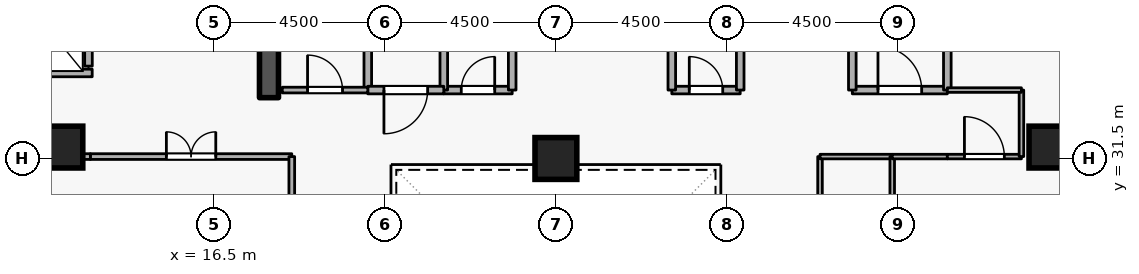
"""IFC4 building model, lengths in metres.
Left out: names, types, materials, properties, quantities, classifications, styles, units other than length and angle.
Written with IfcOpenShell. Run it as: python <this file> out.ifc"""

import sys

from ifc_helpers import new_model, si_unit, direction, frame, frame_2d, origin, origin_2d, place, context, subcontext, project, spatial, rectangle, extrude, element, fill, save


model = new_model("IFC4")
c1 = context("Model", 3, precision=1e-05, world=origin(), true_north=direction((0.0, 1.0)))
c2 = subcontext(c1, "Body", "Model", "MODEL_VIEW")
j1 = project(units=[si_unit("LENGTHUNIT", "METRE"), si_unit("PLANEANGLEUNIT", "RADIAN")], contexts=[c1])
p1 = place(None, origin())
s1 = spatial("IfcSite", under=j1, at=p1, CompositionType="ELEMENT")
p2 = place(p1, origin())
s2 = spatial("IfcBuilding", under=s1, at=p2, CompositionType="ELEMENT")
p3 = place(p2, frame((0.0, 0.0, 170.7)))
s3 = spatial("IfcBuildingStorey", under=s2, at=p3, CompositionType="ELEMENT", Elevation=170.7)
p4 = place(p3, frame((17.95, 33.1, 0.0), z_axis=(0.0, 0.0, 1.0), x_axis=(0.0, 1.0, 0.0)))
e1 = element("IfcWall", 1, at=p4, inside=s3, PredefinedType="SHEAR", context=c2, shape_type="SweptSolid", body=[
    extrude(rectangle(XDim=5.8, YDim=0.5, at=frame_2d((2.9, 0.0))), origin(), (0.0, 0.0, 1.0), 3.6),
])
for number, where, z_axis, x_axis in (
    (2, (12.5, 31.8, 0.0), (0.0, 0.0, 1.0), (1.0, 0.0, 0.0)),
    (3, (38.5, 31.8, 0.0), (0.0, 0.0, 1.0), (1.0, 0.0, 0.0)),
    (4, (25.5, 31.5, 0.0), (0.0, 0.0, 1.0), (1.0, 0.0, 0.0)),
):
    element("IfcColumn", number, at=place(p3, frame(where, z_axis=z_axis, x_axis=x_axis)), inside=s3, PredefinedType="COLUMN", context=c2, shape_type="SweptSolid", body=[
        extrude(rectangle(XDim=1.1, YDim=1.1, at=origin_2d()), origin(), (0.0, 0.0, 1.0), 3.6),
    ])
p5 = place(p3, frame((13.2, 33.93, 0.0), z_axis=(0.0, 0.0, 1.0), x_axis=(0.0, 1.0, 0.0)))
e5 = element("IfcWall", 5, at=p5, inside=s3, PredefinedType="STANDARD", context=c2, shape_type="SweptSolid", body=[
    extrude(rectangle(XDim=1.94, YDim=0.2, at=frame_2d((0.97, 0.0))), origin(), (0.0, 0.0, 1.0), 3.26),
])
p6 = place(p5, frame((0.46, 0.0, 0.0)))
e6 = element("IfcOpeningElement", 6, at=p6, cuts=e5, PredefinedType="OPENING", context=c2, shape_type="SweptSolid", body=[
    extrude(rectangle(XDim=1.02, YDim=2.06, at=frame_2d((0.51, 1.03))), frame((0.0, 0.11, 0.0), z_axis=(0.0, -1.0, 0.0), x_axis=(1.0, 0.0, 0.0)), (0.0, 0.0, 1.0), 0.22),
])
p7 = place(p3, frame((11.002, 33.75, 0.0), z_axis=(0.0, 0.0, 1.0), x_axis=(1.0, 0.0, 0.0)))
e7 = element("IfcWall", 7, at=p7, inside=s3, PredefinedType="STANDARD", context=c2, shape_type="SweptSolid", body=[
    extrude(rectangle(XDim=2.296, YDim=0.2, at=frame_2d((1.148, 0.0))), origin(), (0.0, 0.0, 1.0), 3.26),
])
p8 = place(p3, frame((33.3, 33.3, 0.0), z_axis=(0.0, 0.0, 1.0), x_axis=(1.0, 0.0, 0.0)))
e8 = element("IfcWall", 8, at=p8, inside=s3, PredefinedType="STANDARD", context=c2, shape_type="SweptSolid", body=[
    extrude(rectangle(XDim=2.5, YDim=0.2, at=frame_2d((1.25, 0.0))), origin(), (0.0, 0.0, 1.0), 3.26),
])
p9 = place(p8, frame((0.675, 0.0, 0.0)))
e9 = element("IfcOpeningElement", 9, at=p9, cuts=e8, PredefinedType="OPENING", context=c2, shape_type="SweptSolid", body=[
    extrude(rectangle(XDim=1.15, YDim=2.1, at=frame_2d((0.575, 1.05))), frame((0.0, 0.11, 0.0), z_axis=(0.0, -1.0, 0.0), x_axis=(1.0, 0.0, 0.0)), (0.0, 0.0, 1.0), 0.22),
])
p10 = place(p3, frame((35.8, 33.3, 0.0), z_axis=(0.0, 0.0, 1.0), x_axis=(0.0, 1.0, 0.0)))
e10 = element("IfcWall", 10, at=p10, inside=s3, PredefinedType="STANDARD", context=c2, shape_type="SweptSolid", body=[
    extrude(rectangle(XDim=5.7, YDim=0.2, at=frame_2d((2.85, 0.0))), origin(), (0.0, 0.0, 1.0), 3.26),
])
p11 = place(p3, frame((33.3, 35.6, 0.0), z_axis=(0.0, 0.0, 1.0), x_axis=(0.0, -1.0, 0.0)))
e11 = element("IfcWall", 11, at=p11, inside=s3, PredefinedType="STANDARD", context=c2, shape_type="SweptSolid", body=[
    extrude(rectangle(XDim=2.3, YDim=0.2, at=frame_2d((1.15, 0.0))), origin(), (0.0, 0.0, 1.0), 2.465),
])
p12 = place(p3, frame((22.55, 33.3, 0.0), z_axis=(0.0, 0.0, 1.0), x_axis=(1.0, 0.0, 0.0)))
e12 = element("IfcWall", 12, at=p12, inside=s3, PredefinedType="STANDARD", context=c2, shape_type="SweptSolid", body=[
    extrude(rectangle(XDim=1.8, YDim=0.2, at=frame_2d((0.9, 0.0))), origin(), (0.0, 0.0, 1.0), 3.26),
])
p13 = place(p12, frame((0.46, 0.0, 0.0)))
e13 = element("IfcOpeningElement", 13, at=p13, cuts=e12, PredefinedType="OPENING", context=c2, shape_type="SweptSolid", body=[
    extrude(rectangle(XDim=0.88, YDim=2.04, at=frame_2d((0.44, 1.02))), frame((0.0, 0.11, 0.0), z_axis=(0.0, -1.0, 0.0), x_axis=(1.0, 0.0, 0.0)), (0.0, 0.0, 1.0), 0.22),
])
for number, where, z_axis, x_axis in (
    (14, (24.35, 33.3, 0.0), (0.0, 0.0, 1.0), (0.0, 1.0, 0.0)),
    (15, (22.55, 35.35, 0.0), (0.0, 0.0, 1.0), (0.0, -1.0, 0.0)),
):
    element("IfcWall", number, at=place(p3, frame(where, z_axis=z_axis, x_axis=x_axis)), inside=s3, PredefinedType="STANDARD", context=c2, shape_type="SweptSolid", body=[
        extrude(rectangle(XDim=2.05, YDim=0.2, at=frame_2d((1.025, 0.0))), origin(), (0.0, 0.0, 1.0), 3.26),
    ])
p14 = place(p3, frame((28.55, 33.3, 0.0), z_axis=(0.0, 0.0, 1.0), x_axis=(1.0, 0.0, 0.0)))
e16 = element("IfcWall", 16, at=p14, inside=s3, PredefinedType="STANDARD", context=c2, shape_type="SweptSolid", body=[
    extrude(rectangle(XDim=1.8, YDim=0.2, at=frame_2d((0.9, 0.0))), origin(), (0.0, 0.0, 1.0), 3.26),
])
p15 = place(p14, frame((0.46, 0.0, 0.0)))
e17 = element("IfcOpeningElement", 17, at=p15, cuts=e16, PredefinedType="OPENING", context=c2, shape_type="SweptSolid", body=[
    extrude(rectangle(XDim=0.88, YDim=2.04, at=frame_2d((0.44, 1.02))), frame((0.0, 0.11, 0.0), z_axis=(0.0, -1.0, 0.0), x_axis=(1.0, 0.0, 0.0)), (0.0, 0.0, 1.0), 0.22),
])
for number, where, z_axis, x_axis in (
    (18, (30.35, 33.3, 0.0), (0.0, 0.0, 1.0), (0.0, 1.0, 0.0)),
    (19, (28.55, 35.35, 0.0), (0.0, 0.0, 1.0), (0.0, -1.0, 0.0)),
    (20, (20.55, 33.3, 0.0), (0.0, 0.0, 1.0), (0.0, 1.0, 0.0)),
):
    element("IfcWall", number, at=place(p3, frame(where, z_axis=z_axis, x_axis=x_axis)), inside=s3, PredefinedType="STANDARD", context=c2, shape_type="SweptSolid", body=[
        extrude(rectangle(XDim=2.05, YDim=0.2, at=frame_2d((1.025, 0.0))), origin(), (0.0, 0.0, 1.0), 3.26),
    ])
p16 = place(p3, frame((22.55, 33.3, 0.0), z_axis=(0.0, 0.0, 1.0), x_axis=(-1.0, 0.0, 0.0)))
e21 = element("IfcWall", 21, at=p16, inside=s3, PredefinedType="STANDARD", context=c2, shape_type="SweptSolid", body=[
    extrude(rectangle(XDim=2.0, YDim=0.2, at=frame_2d((1.0, 0.0))), origin(), (0.0, 0.0, 1.0), 3.26),
])
p17 = place(p16, frame((0.425, 0.0, 0.0)))
e22 = element("IfcOpeningElement", 22, at=p17, cuts=e21, PredefinedType="OPENING", context=c2, shape_type="SweptSolid", body=[
    extrude(rectangle(XDim=1.15, YDim=2.1, at=frame_2d((0.575, 1.05))), frame((0.0, 0.11, 0.0), z_axis=(0.0, -1.0, 0.0), x_axis=(1.0, 0.0, 0.0)), (0.0, 0.0, 1.0), 0.22),
])
p18 = place(p3, frame((18.3, 33.3, 0.0), z_axis=(0.0, 0.0, 1.0), x_axis=(1.0, 0.0, 0.0)))
e23 = element("IfcWall", 23, at=p18, inside=s3, PredefinedType="PARTITIONING", context=c2, shape_type="SweptSolid", body=[
    extrude(rectangle(XDim=2.25, YDim=0.15, at=frame_2d((1.125, 0.0))), origin(), (0.0, 0.0, 1.0), 3.26),
])
p19 = place(p18, frame((0.665, 0.0, 0.0)))
e24 = element("IfcOpeningElement", 24, at=p19, cuts=e23, PredefinedType="OPENING", context=c2, shape_type="SweptSolid", body=[
    extrude(rectangle(XDim=0.92, YDim=2.08, at=frame_2d((0.46, 1.04))), frame((0.0, 0.085, 0.0), z_axis=(0.0, -1.0, 0.0), x_axis=(1.0, 0.0, 0.0)), (0.0, 0.0, 1.0), 0.17),
])
p20 = place(p3, frame((13.25, 31.55, 0.0), z_axis=(0.0, 0.0, 1.0), x_axis=(1.0, 0.0, 0.0)))
e25 = element("IfcWall", 25, at=p20, inside=s3, PredefinedType="PARTITIONING", context=c2, shape_type="SweptSolid", body=[
    extrude(rectangle(XDim=5.3, YDim=0.15, at=frame_2d((2.65, 0.0))), origin(), (0.0, 0.0, 1.0), 3.26),
])
p21 = place(p20, frame((2.0, 0.0, 0.0)))
e26 = element("IfcOpeningElement", 26, at=p21, cuts=e25, PredefinedType="OPENING", context=c2, shape_type="SweptSolid", body=[
    extrude(rectangle(XDim=1.3, YDim=2.12, at=frame_2d((0.65, 1.06))), frame((0.0, 0.085, 0.0), z_axis=(0.0, -1.0, 0.0), x_axis=(1.0, 0.0, 0.0)), (0.0, 0.0, 1.0), 0.17),
])
p22 = place(p3, frame((18.55, 31.55, 0.0), z_axis=(0.0, 0.0, 1.0), x_axis=(0.0, -1.0, 0.0)))
e27 = element("IfcWall", 27, at=p22, inside=s3, PredefinedType="PARTITIONING", context=c2, shape_type="SweptSolid", body=[
    extrude(rectangle(XDim=2.25, YDim=0.15, at=frame_2d((1.125, 0.0))), origin(), (0.0, 0.0, 1.0), 3.26),
])
p23 = place(p3, frame((10.9, 31.55, 0.0), z_axis=(0.0, 0.0, 1.0), x_axis=(1.0, 0.0, 0.0)))
e28 = element("IfcWall", 28, at=p23, inside=s3, PredefinedType="PARTITIONING", context=c2, shape_type="SweptSolid", body=[
    extrude(rectangle(XDim=2.35, YDim=0.15, at=frame_2d((1.175, 0.0))), origin(), (0.0, 0.0, 1.0), 3.26),
])
p24 = place(p3, frame((32.45, 27.0, 0.0), z_axis=(0.0, 0.0, 1.0), x_axis=(0.0, 1.0, 0.0)))
e29 = element("IfcWall", 29, at=p24, inside=s3, PredefinedType="PARTITIONING", context=c2, shape_type="SweptSolid", body=[
    extrude(rectangle(XDim=4.55, YDim=0.12, at=frame_2d((2.275, 0.0))), origin(), (0.0, 0.0, 1.0), 3.26),
])
p25 = place(p24, frame((1.8, 0.0, 0.0)))
e30 = element("IfcOpeningElement", 30, at=p25, cuts=e29, PredefinedType="OPENING", context=c2, shape_type="SweptSolid", body=[
    extrude(rectangle(XDim=0.95, YDim=2.1, at=frame_2d((0.475, 1.05))), frame((0.0, 0.07, 0.0), z_axis=(0.0, -1.0, 0.0), x_axis=(1.0, 0.0, 0.0)), (0.0, 0.0, 1.0), 0.14),
])
p26 = place(p3, frame((32.45, 31.55, 0.0), z_axis=(0.0, 0.0, 1.0), x_axis=(1.0, 0.0, 0.0)))
e31 = element("IfcWall", 31, at=p26, inside=s3, PredefinedType="PARTITIONING", context=c2, shape_type="SweptSolid", body=[
    extrude(rectangle(XDim=1.9, YDim=0.12, at=frame_2d((0.95, 0.0))), origin(), (0.0, 0.0, 1.0), 3.26),
])
p27 = place(p3, frame((34.35, 31.55, 0.0), z_axis=(0.0, 0.0, 1.0), x_axis=(0.0, -1.0, 0.0)))
e32 = element("IfcWall", 32, at=p27, inside=s3, PredefinedType="PARTITIONING", context=c2, shape_type="SweptSolid", body=[
    extrude(rectangle(XDim=4.55, YDim=0.12, at=frame_2d((2.275, 0.0))), origin(), (0.0, 0.0, 1.0), 3.26),
])
p28 = place(p3, frame((34.35, 31.55, 0.0), z_axis=(0.0, 0.0, 1.0), x_axis=(1.0, 0.0, 0.0)))
e33 = element("IfcWall", 33, at=p28, inside=s3, PredefinedType="PARTITIONING", context=c2, shape_type="SweptSolid", body=[
    extrude(rectangle(XDim=1.45, YDim=0.12, at=frame_2d((0.725, 0.0))), origin(), (0.0, 0.0, 1.0), 3.26),
])
p29 = place(p3, frame((35.8, 31.55, 0.0), z_axis=(0.0, 0.0, 1.0), x_axis=(1.0, 0.0, 0.0)))
e34 = element("IfcWall", 34, at=p29, inside=s3, PredefinedType="PARTITIONING", context=c2, shape_type="SweptSolid", body=[
    extrude(rectangle(XDim=1.95, YDim=0.12, at=frame_2d((0.975, 0.0))), origin(), (0.0, 0.0, 1.0), 3.26),
])
p30 = place(p29, frame((0.45, 0.0, 0.0)))
e35 = element("IfcOpeningElement", 35, at=p30, cuts=e34, PredefinedType="OPENING", context=c2, shape_type="SweptSolid", body=[
    extrude(rectangle(XDim=1.05, YDim=2.1, at=frame_2d((0.525, 1.05))), frame((0.0, 0.07, 0.0), z_axis=(0.0, -1.0, 0.0), x_axis=(1.0, 0.0, 0.0)), (0.0, 0.0, 1.0), 0.14),
])
p31 = place(p3, frame((37.75, 31.55, 0.0), z_axis=(0.0, 0.0, 1.0), x_axis=(0.0, 1.0, 0.0)))
e36 = element("IfcWall", 36, at=p31, inside=s3, PredefinedType="PARTITIONING", context=c2, shape_type="SweptSolid", body=[
    extrude(rectangle(XDim=1.75, YDim=0.12, at=frame_2d((0.875, 0.0))), origin(), (0.0, 0.0, 1.0), 3.26),
])
p32 = place(p3, frame((37.75, 33.3, 0.0), z_axis=(0.0, 0.0, 1.0), x_axis=(-1.0, 0.0, 0.0)))
e37 = element("IfcWall", 37, at=p32, inside=s3, PredefinedType="PARTITIONING", context=c2, shape_type="SweptSolid", body=[
    extrude(rectangle(XDim=1.95, YDim=0.12, at=frame_2d((0.975, 0.0))), origin(), (0.0, 0.0, 1.0), 3.26),
])
p33 = place(p9, origin())
e38 = element("IfcDoor", 38, at=p33, inside=s3, OperationType="SINGLE_SWING_LEFT", PredefinedType="DOOR", context=c2, shape_type="SweptSolid", body=[
    extrude(rectangle(XDim=1.15, YDim=2.1, at=frame_2d((0.575, 1.05))), frame((0.0, 0.025, 0.0), z_axis=(0.0, -1.0, 0.0), x_axis=(1.0, 0.0, 0.0)), (0.0, 0.0, 1.0), 0.05),
])
fill(e9, e38)
p34 = place(p13, origin())
e39 = element("IfcDoor", 39, at=p34, inside=s3, OperationType="SINGLE_SWING_RIGHT", PredefinedType="DOOR", context=c2, shape_type="SweptSolid", body=[
    extrude(rectangle(XDim=0.88, YDim=2.04, at=frame_2d((0.44, 1.02))), frame((0.0, 0.025, 0.0), z_axis=(0.0, -1.0, 0.0), x_axis=(1.0, 0.0, 0.0)), (0.0, 0.0, 1.0), 0.05),
])
fill(e13, e39)
p35 = place(p15, origin())
e40 = element("IfcDoor", 40, at=p35, inside=s3, OperationType="SINGLE_SWING_LEFT", PredefinedType="DOOR", context=c2, shape_type="SweptSolid", body=[
    extrude(rectangle(XDim=0.88, YDim=2.04, at=frame_2d((0.44, 1.02))), frame((0.0, 0.025, 0.0), z_axis=(0.0, -1.0, 0.0), x_axis=(1.0, 0.0, 0.0)), (0.0, 0.0, 1.0), 0.05),
])
fill(e17, e40)
p36 = place(p19, origin())
e41 = element("IfcDoor", 41, at=p36, inside=s3, OperationType="SINGLE_SWING_LEFT", PredefinedType="DOOR", context=c2, shape_type="SweptSolid", body=[
    extrude(rectangle(XDim=0.92, YDim=2.08, at=frame_2d((0.46, 1.04))), frame((0.0, 0.025, 0.0), z_axis=(0.0, -1.0, 0.0), x_axis=(1.0, 0.0, 0.0)), (0.0, 0.0, 1.0), 0.05),
])
fill(e24, e41)
p37 = place(p17, origin())
e42 = element("IfcDoor", 42, at=p37, inside=s3, OperationType="SINGLE_SWING_RIGHT", PredefinedType="DOOR", context=c2, shape_type="SweptSolid", body=[
    extrude(rectangle(XDim=1.15, YDim=2.1, at=frame_2d((0.575, 1.05))), frame((0.0, 0.025, 0.0), z_axis=(0.0, -1.0, 0.0), x_axis=(1.0, 0.0, 0.0)), (0.0, 0.0, 1.0), 0.05),
])
fill(e22, e42)
p38 = place(p21, origin())
e43 = element("IfcDoor", 43, at=p38, inside=s3, OperationType="DOUBLE_DOOR_SINGLE_SWING", PredefinedType="DOOR", context=c2, shape_type="SweptSolid", body=[
    extrude(rectangle(XDim=1.3, YDim=2.12, at=frame_2d((0.65, 1.06))), frame((0.0, 0.025, 0.0), z_axis=(0.0, -1.0, 0.0), x_axis=(1.0, 0.0, 0.0)), (0.0, 0.0, 1.0), 0.05),
])
fill(e26, e43)
p39 = place(p30, origin())
e44 = element("IfcDoor", 44, at=p39, inside=s3, OperationType="SINGLE_SWING_LEFT", PredefinedType="DOOR", context=c2, shape_type="SweptSolid", body=[
    extrude(rectangle(XDim=1.05, YDim=2.1, at=frame_2d((0.525, 1.05))), frame((0.0, 0.025, 0.0), z_axis=(0.0, -1.0, 0.0), x_axis=(1.0, 0.0, 0.0)), (0.0, 0.0, 1.0), 0.05),
])
fill(e35, e44)
save(model, sys.argv[1])
